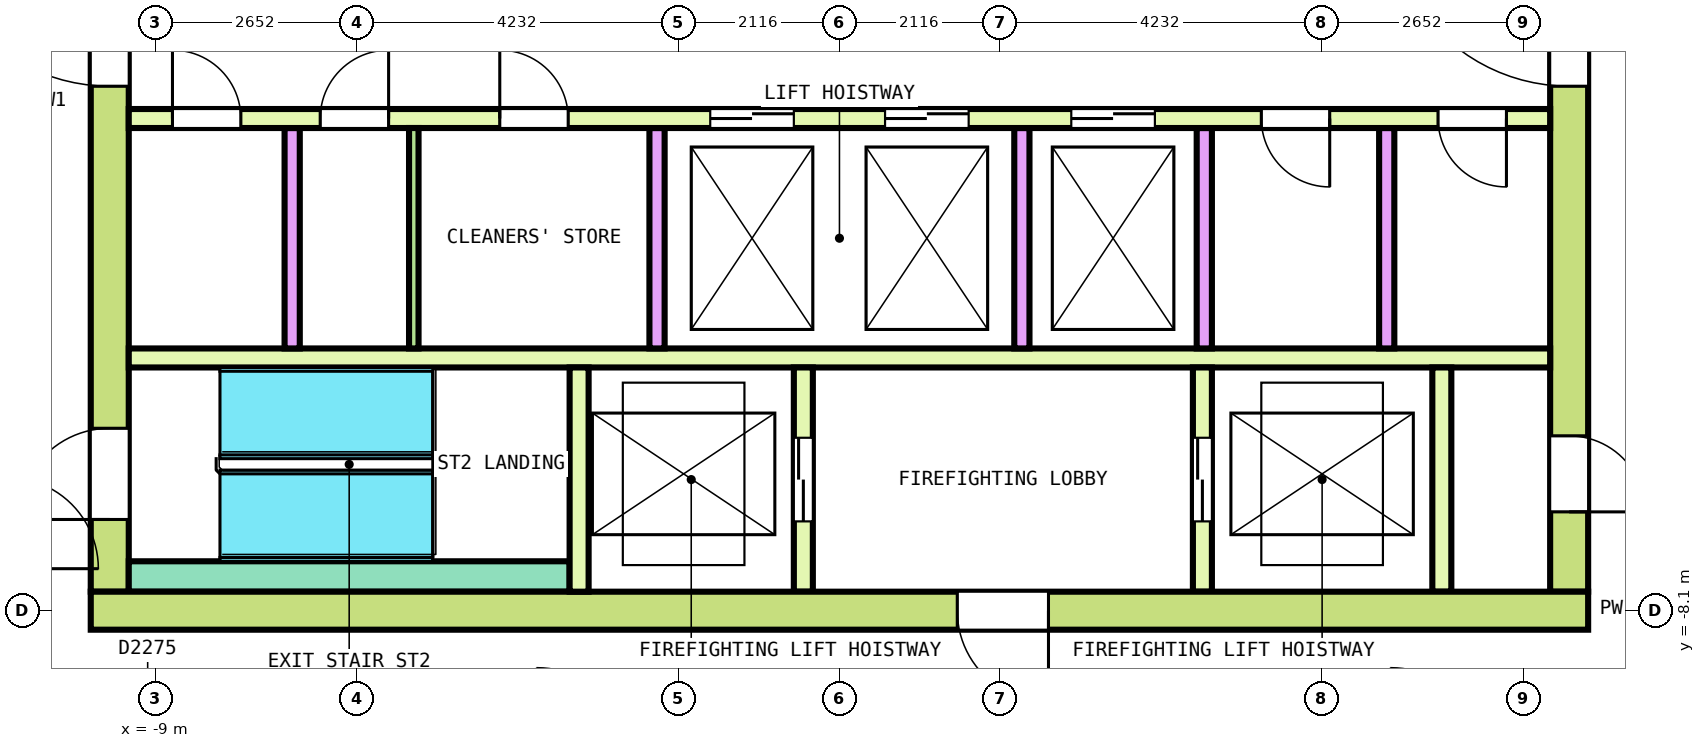
"""IFC4 building model, lengths in metres.
Left out: names, types, materials, properties, quantities, classifications, styles, units other than length and angle.
Written with IfcOpenShell. Run it as: python <this file> out.ifc"""

import sys

from ifc_helpers import new_model, si_unit, direction, frame, frame_2d, origin, place, context, subcontext, project, spatial, rectangle, extrude, element, fill, save


model = new_model("IFC4")
c1 = context("Model", 3, precision=1e-05, world=origin(), true_north=direction((0.0, 1.0)))
c2 = subcontext(c1, "Body", "Model", "MODEL_VIEW")
j1 = project(units=[si_unit("LENGTHUNIT", "METRE"), si_unit("PLANEANGLEUNIT", "RADIAN")], contexts=[c1])
p1 = place(None, origin())
s1 = spatial("IfcSite", under=j1, at=p1, CompositionType="ELEMENT")
p2 = place(p1, origin())
s2 = spatial("IfcBuilding", under=s1, at=p2, CompositionType="ELEMENT")
p3 = place(p2, frame((0.0, 0.0, 299.0)))
s3 = spatial("IfcBuildingStorey", under=s2, at=p3, CompositionType="ELEMENT", Elevation=299.0)
p4 = place(p3, frame((-9.85, -8.1, 0.0), z_axis=(0.0, 0.0, 1.0), x_axis=(1.0, 0.0, 0.0)))
e1 = element("IfcWall", 1, at=p4, inside=s3, PredefinedType="SHEAR", context=c2, shape_type="SweptSolid", body=[
    extrude(rectangle(XDim=19.7, YDim=0.5, at=frame_2d((9.85, 0.0))), origin(), (0.0, 0.0, 1.0), 3.7),
])
p5 = place(p4, frame((11.4, 0.0, 0.0)))
e2 = element("IfcOpeningElement", 2, at=p5, cuts=e1, PredefinedType="OPENING", context=c2, shape_type="SweptSolid", body=[
    extrude(rectangle(XDim=1.2, YDim=2.1, at=frame_2d((0.6, 1.05))), frame((0.0, 0.26, 0.0), z_axis=(0.0, -1.0, 0.0), x_axis=(1.0, 0.0, 0.0)), (0.0, 0.0, 1.0), 0.52),
])
p6 = place(p3, frame((-9.6, -7.85, 0.0), z_axis=(0.0, 0.0, 1.0), x_axis=(0.0, 1.0, 0.0)))
e3 = element("IfcWall", 3, at=p6, inside=s3, PredefinedType="SHEAR", context=c2, shape_type="SweptSolid", body=[
    extrude(rectangle(XDim=15.7, YDim=0.5, at=frame_2d((7.85, 0.0))), origin(), (0.0, 0.0, 1.0), 3.7),
])
p7 = place(p6, frame((6.65, 0.0, 0.0)))
e4 = element("IfcOpeningElement", 4, at=p7, cuts=e3, PredefinedType="OPENING", context=c2, shape_type="SweptSolid", body=[
    extrude(rectangle(XDim=2.4, YDim=2.1, at=frame_2d((1.2, 1.05))), frame((0.0, 0.26, 0.0), z_axis=(0.0, -1.0, 0.0), x_axis=(1.0, 0.0, 0.0)), (0.0, 0.0, 1.0), 0.52),
])
p8 = place(p6, frame((13.55, 0.0, 0.0)))
e5 = element("IfcOpeningElement", 5, at=p8, cuts=e3, PredefinedType="OPENING", context=c2, shape_type="SweptSolid", body=[
    extrude(rectangle(XDim=1.2, YDim=2.1, at=frame_2d((0.6, 1.05))), frame((0.0, 0.26, 0.0), z_axis=(0.0, -1.0, 0.0), x_axis=(1.0, 0.0, 0.0)), (0.0, 0.0, 1.0), 0.52),
])
p9 = place(p6, frame((0.95, 0.0, 0.0)))
e6 = element("IfcOpeningElement", 6, at=p9, cuts=e3, PredefinedType="OPENING", context=c2, shape_type="SweptSolid", body=[
    extrude(rectangle(XDim=1.2, YDim=2.1, at=frame_2d((0.6, 1.05))), frame((0.0, 0.26, 0.0), z_axis=(0.0, -1.0, 0.0), x_axis=(1.0, 0.0, 0.0)), (0.0, 0.0, 1.0), 0.52),
])
p10 = place(p3, frame((9.6, -7.85, 0.0), z_axis=(0.0, 0.0, 1.0), x_axis=(0.0, 1.0, 0.0)))
e7 = element("IfcWall", 7, at=p10, inside=s3, PredefinedType="SHEAR", context=c2, shape_type="SweptSolid", body=[
    extrude(rectangle(XDim=15.7, YDim=0.5, at=frame_2d((7.85, 0.0))), origin(), (0.0, 0.0, 1.0), 3.7),
])
p11 = place(p10, frame((6.65, 0.0, 0.0)))
e8 = element("IfcOpeningElement", 8, at=p11, cuts=e7, PredefinedType="OPENING", context=c2, shape_type="SweptSolid", body=[
    extrude(rectangle(XDim=2.4, YDim=2.1, at=frame_2d((1.2, 1.05))), frame((0.0, 0.26, 0.0), z_axis=(0.0, -1.0, 0.0), x_axis=(1.0, 0.0, 0.0)), (0.0, 0.0, 1.0), 0.52),
])
p12 = place(p10, frame((13.55, 0.0, 0.0)))
e9 = element("IfcOpeningElement", 9, at=p12, cuts=e7, PredefinedType="OPENING", context=c2, shape_type="SweptSolid", body=[
    extrude(rectangle(XDim=1.2, YDim=2.1, at=frame_2d((0.6, 1.05))), frame((0.0, 0.26, 0.0), z_axis=(0.0, -1.0, 0.0), x_axis=(1.0, 0.0, 0.0)), (0.0, 0.0, 1.0), 0.52),
])
p13 = place(p10, frame((1.05, 0.0, 0.0)))
e10 = element("IfcOpeningElement", 10, at=p13, cuts=e7, PredefinedType="OPENING", context=c2, shape_type="SweptSolid", body=[
    extrude(rectangle(XDim=1.0, YDim=2.1, at=frame_2d((0.5, 1.05))), frame((0.0, 0.26, 0.0), z_axis=(0.0, -1.0, 0.0), x_axis=(1.0, 0.0, 0.0)), (0.0, 0.0, 1.0), 0.52),
])
p14 = place(p3, frame((-9.35, -1.625, 0.0), z_axis=(0.0, 0.0, 1.0), x_axis=(1.0, 0.0, 0.0)))
e11 = element("IfcWall", 11, at=p14, inside=s3, PredefinedType="SOLIDWALL", context=c2, shape_type="SweptSolid", body=[
    extrude(rectangle(XDim=18.7, YDim=0.25, at=frame_2d((9.35, 0.0))), origin(), (0.0, 0.0, 1.0), 3.7),
])
p15 = place(p14, frame((7.65, 0.0, 0.0)))
e12 = element("IfcOpeningElement", 12, at=p15, cuts=e11, PredefinedType="OPENING", context=c2, shape_type="SweptSolid", body=[
    extrude(rectangle(XDim=1.1, YDim=2.1, at=frame_2d((0.55, 1.05))), frame((0.0, 0.135, 0.0), z_axis=(0.0, -1.0, 0.0), x_axis=(1.0, 0.0, 0.0)), (0.0, 0.0, 1.0), 0.27),
])
p16 = place(p14, frame((9.95, 0.0, 0.0)))
e13 = element("IfcOpeningElement", 13, at=p16, cuts=e11, PredefinedType="OPENING", context=c2, shape_type="SweptSolid", body=[
    extrude(rectangle(XDim=1.1, YDim=2.1, at=frame_2d((0.55, 1.05))), frame((0.0, 0.135, 0.0), z_axis=(0.0, -1.0, 0.0), x_axis=(1.0, 0.0, 0.0)), (0.0, 0.0, 1.0), 0.27),
])
p17 = place(p14, frame((12.4, 0.0, 0.0)))
e14 = element("IfcOpeningElement", 14, at=p17, cuts=e11, PredefinedType="OPENING", context=c2, shape_type="SweptSolid", body=[
    extrude(rectangle(XDim=1.1, YDim=2.1, at=frame_2d((0.55, 1.05))), frame((0.0, 0.135, 0.0), z_axis=(0.0, -1.0, 0.0), x_axis=(1.0, 0.0, 0.0)), (0.0, 0.0, 1.0), 0.27),
])
p18 = place(p14, frame((0.575, 0.0, 0.0)))
e15 = element("IfcOpeningElement", 15, at=p18, cuts=e11, PredefinedType="OPENING", context=c2, shape_type="SweptSolid", body=[
    extrude(rectangle(XDim=0.9, YDim=2.1, at=frame_2d((0.45, 1.05))), frame((0.0, 0.135, 0.0), z_axis=(0.0, -1.0, 0.0), x_axis=(1.0, 0.0, 0.0)), (0.0, 0.0, 1.0), 0.27),
])
p19 = place(p14, frame((2.519, 0.0, 0.0)))
e16 = element("IfcOpeningElement", 16, at=p19, cuts=e11, PredefinedType="OPENING", context=c2, shape_type="SweptSolid", body=[
    extrude(rectangle(XDim=0.9, YDim=2.1, at=frame_2d((0.45, 1.05))), frame((0.0, 0.135, 0.0), z_axis=(0.0, -1.0, 0.0), x_axis=(1.0, 0.0, 0.0)), (0.0, 0.0, 1.0), 0.27),
])
p20 = place(p14, frame((4.881, 0.0, 0.0)))
e17 = element("IfcOpeningElement", 17, at=p20, cuts=e11, PredefinedType="OPENING", context=c2, shape_type="SweptSolid", body=[
    extrude(rectangle(XDim=0.9, YDim=2.1, at=frame_2d((0.45, 1.05))), frame((0.0, 0.135, 0.0), z_axis=(0.0, -1.0, 0.0), x_axis=(1.0, 0.0, 0.0)), (0.0, 0.0, 1.0), 0.27),
])
p21 = place(p14, frame((14.9, 0.0, 0.0)))
e18 = element("IfcOpeningElement", 18, at=p21, cuts=e11, PredefinedType="OPENING", context=c2, shape_type="SweptSolid", body=[
    extrude(rectangle(XDim=0.9, YDim=2.1, at=frame_2d((0.45, 1.05))), frame((0.0, 0.135, 0.0), z_axis=(0.0, -1.0, 0.0), x_axis=(1.0, 0.0, 0.0)), (0.0, 0.0, 1.0), 0.27),
])
p22 = place(p14, frame((17.225, 0.0, 0.0)))
e19 = element("IfcOpeningElement", 19, at=p22, cuts=e11, PredefinedType="OPENING", context=c2, shape_type="SweptSolid", body=[
    extrude(rectangle(XDim=0.9, YDim=2.1, at=frame_2d((0.45, 1.05))), frame((0.0, 0.135, 0.0), z_axis=(0.0, -1.0, 0.0), x_axis=(1.0, 0.0, 0.0)), (0.0, 0.0, 1.0), 0.27),
])
p23 = place(p3, frame((-9.35, -4.775, 0.0), z_axis=(0.0, 0.0, 1.0), x_axis=(1.0, 0.0, 0.0)))
e20 = element("IfcWall", 20, at=p23, inside=s3, PredefinedType="SOLIDWALL", context=c2, shape_type="SweptSolid", body=[
    extrude(rectangle(XDim=18.7, YDim=0.25, at=frame_2d((9.35, 0.0))), origin(), (0.0, 0.0, 1.0), 3.7),
])
for number, where, z_axis, x_axis in (
    (21, (-7.2, -4.65, 0.0), (0.0, 0.0, 1.0), (0.0, 1.0, 0.0)),
    (22, (-2.4, -4.65, 0.0), (0.0, 0.0, 1.0), (0.0, 1.0, 0.0)),
    (23, (2.4, -4.65, 0.0), (0.0, 0.0, 1.0), (0.0, 1.0, 0.0)),
    (24, (4.8, -4.65, 0.0), (0.0, 0.0, 1.0), (0.0, 1.0, 0.0)),
    (25, (7.2, -4.65, 0.0), (0.0, 0.0, 1.0), (0.0, 1.0, 0.0)),
):
    element("IfcWall", number, at=place(p3, frame(where, z_axis=z_axis, x_axis=x_axis)), inside=s3, PredefinedType="SOLIDWALL", context=c2, shape_type="SweptSolid", body=[
        extrude(rectangle(XDim=2.9, YDim=0.2, at=frame_2d((1.45, 0.0))), origin(), (0.0, 0.0, 1.0), 3.7),
    ])
p24 = place(p3, frame((-9.35, -7.65, 0.0), z_axis=(0.0, 0.0, 1.0), x_axis=(1.0, 0.0, 0.0)))
e26 = element("IfcWall", 26, at=p24, inside=s3, PredefinedType="SOLIDWALL", context=c2, shape_type="SweptSolid", body=[
    extrude(rectangle(XDim=5.8, YDim=0.4, at=frame_2d((2.9, 0.0))), origin(), (0.0, 0.0, 1.0), 3.7),
])
p25 = place(p3, frame((-3.425, -7.85, 0.0), z_axis=(0.0, 0.0, 1.0), x_axis=(0.0, 1.0, 0.0)))
e27 = element("IfcWall", 27, at=p25, inside=s3, PredefinedType="SOLIDWALL", context=c2, shape_type="SweptSolid", body=[
    extrude(rectangle(XDim=2.95, YDim=0.25, at=frame_2d((1.475, 0.0))), origin(), (0.0, 0.0, 1.0), 3.7),
])
p26 = place(p3, frame((-0.475, -7.85, 0.0), z_axis=(0.0, 0.0, 1.0), x_axis=(0.0, 1.0, 0.0)))
e28 = element("IfcWall", 28, at=p26, inside=s3, PredefinedType="SOLIDWALL", context=c2, shape_type="SweptSolid", body=[
    extrude(rectangle(XDim=2.95, YDim=0.25, at=frame_2d((1.475, 0.0))), origin(), (0.0, 0.0, 1.0), 3.7),
])
p27 = place(p26, frame((0.925, 0.0, 0.0)))
e29 = element("IfcOpeningElement", 29, at=p27, cuts=e28, PredefinedType="OPENING", context=c2, shape_type="SweptSolid", body=[
    extrude(rectangle(XDim=1.1, YDim=2.1, at=frame_2d((0.55, 1.05))), frame((0.0, 0.135, 0.0), z_axis=(0.0, -1.0, 0.0), x_axis=(1.0, 0.0, 0.0)), (0.0, 0.0, 1.0), 0.27),
])
p28 = place(p3, frame((4.775, -7.85, 0.0), z_axis=(0.0, 0.0, 1.0), x_axis=(0.0, 1.0, 0.0)))
e30 = element("IfcWall", 30, at=p28, inside=s3, PredefinedType="SOLIDWALL", context=c2, shape_type="SweptSolid", body=[
    extrude(rectangle(XDim=2.95, YDim=0.25, at=frame_2d((1.475, 0.0))), origin(), (0.0, 0.0, 1.0), 3.7),
])
p29 = place(p28, frame((0.925, 0.0, 0.0)))
e31 = element("IfcOpeningElement", 31, at=p29, cuts=e30, PredefinedType="OPENING", context=c2, shape_type="SweptSolid", body=[
    extrude(rectangle(XDim=1.1, YDim=2.1, at=frame_2d((0.55, 1.05))), frame((0.0, 0.135, 0.0), z_axis=(0.0, -1.0, 0.0), x_axis=(1.0, 0.0, 0.0)), (0.0, 0.0, 1.0), 0.27),
])
p30 = place(p3, frame((7.925, -7.85, 0.0), z_axis=(0.0, 0.0, 1.0), x_axis=(0.0, 1.0, 0.0)))
e32 = element("IfcWall", 32, at=p30, inside=s3, PredefinedType="SOLIDWALL", context=c2, shape_type="SweptSolid", body=[
    extrude(rectangle(XDim=2.95, YDim=0.25, at=frame_2d((1.475, 0.0))), origin(), (0.0, 0.0, 1.0), 3.7),
])
p31 = place(p3, frame((-5.6, -4.65, 0.0), z_axis=(0.0, 0.0, 1.0), x_axis=(0.0, 1.0, 0.0)))
e33 = element("IfcWall", 33, at=p31, inside=s3, PredefinedType="PARTITIONING", context=c2, shape_type="SweptSolid", body=[
    extrude(rectangle(XDim=2.9, YDim=0.125, at=frame_2d((1.45, 0.0))), origin(), (0.0, 0.0, 1.0), 3.7),
])
p32 = place(p15, origin())
e34 = element("IfcDoor", 34, at=p32, inside=s3, OperationType="DOUBLE_DOOR_SLIDING", PredefinedType="DOOR", context=c2, shape_type="SweptSolid", body=[
    extrude(rectangle(XDim=1.1, YDim=2.1, at=frame_2d((0.55, 1.05))), frame((0.0, 0.075, 0.0), z_axis=(0.0, -1.0, 0.0), x_axis=(1.0, 0.0, 0.0)), (0.0, 0.0, 1.0), 0.15),
])
fill(e12, e34)
p33 = place(p16, origin())
e35 = element("IfcDoor", 35, at=p33, inside=s3, OperationType="DOUBLE_DOOR_SLIDING", PredefinedType="DOOR", context=c2, shape_type="SweptSolid", body=[
    extrude(rectangle(XDim=1.1, YDim=2.1, at=frame_2d((0.55, 1.05))), frame((0.0, 0.075, 0.0), z_axis=(0.0, -1.0, 0.0), x_axis=(1.0, 0.0, 0.0)), (0.0, 0.0, 1.0), 0.15),
])
fill(e13, e35)
p34 = place(p17, origin())
e36 = element("IfcDoor", 36, at=p34, inside=s3, OperationType="DOUBLE_DOOR_SLIDING", PredefinedType="DOOR", context=c2, shape_type="SweptSolid", body=[
    extrude(rectangle(XDim=1.1, YDim=2.1, at=frame_2d((0.55, 1.05))), frame((0.0, 0.075, 0.0), z_axis=(0.0, -1.0, 0.0), x_axis=(1.0, 0.0, 0.0)), (0.0, 0.0, 1.0), 0.15),
])
fill(e14, e36)
p35 = place(p27, origin())
e37 = element("IfcDoor", 37, at=p35, inside=s3, OperationType="DOUBLE_DOOR_SLIDING", PredefinedType="DOOR", context=c2, shape_type="SweptSolid", body=[
    extrude(rectangle(XDim=1.1, YDim=2.1, at=frame_2d((0.55, 1.05))), frame((0.0, 0.075, 0.0), z_axis=(0.0, -1.0, 0.0), x_axis=(1.0, 0.0, 0.0)), (0.0, 0.0, 1.0), 0.15),
])
fill(e29, e37)
p36 = place(p29, origin())
e38 = element("IfcDoor", 38, at=p36, inside=s3, OperationType="DOUBLE_DOOR_SLIDING", PredefinedType="DOOR", context=c2, shape_type="SweptSolid", body=[
    extrude(rectangle(XDim=1.1, YDim=2.1, at=frame_2d((0.55, 1.05))), frame((0.0, 0.075, 0.0), z_axis=(0.0, -1.0, 0.0), x_axis=(1.0, 0.0, 0.0)), (0.0, 0.0, 1.0), 0.15),
])
fill(e31, e38)
p37 = place(p7, origin())
e39 = element("IfcDoor", 39, at=p37, inside=s3, OperationType="DOUBLE_DOOR_SINGLE_SWING", PredefinedType="DOOR", context=c2, shape_type="SweptSolid", body=[
    extrude(rectangle(XDim=2.4, YDim=2.1, at=frame_2d((1.2, 1.05))), frame((0.0, 0.2, 0.0), z_axis=(0.0, -1.0, 0.0), x_axis=(1.0, 0.0, 0.0)), (0.0, 0.0, 1.0), 0.4),
])
fill(e4, e39)
p38 = place(p11, origin())
e40 = element("IfcDoor", 40, at=p38, inside=s3, OperationType="DOUBLE_DOOR_SINGLE_SWING", PredefinedType="DOOR", context=c2, shape_type="SweptSolid", body=[
    extrude(rectangle(XDim=2.4, YDim=2.1, at=frame_2d((1.2, 1.05))), frame((0.0, 0.2, 0.0), z_axis=(0.0, -1.0, 0.0), x_axis=(1.0, 0.0, 0.0)), (0.0, 0.0, 1.0), 0.4),
])
fill(e8, e40)
p39 = place(p9, origin())
e41 = element("IfcDoor", 41, at=p39, inside=s3, OperationType="SINGLE_SWING_RIGHT", PredefinedType="DOOR", context=c2, shape_type="SweptSolid", body=[
    extrude(rectangle(XDim=1.2, YDim=2.1, at=frame_2d((0.6, 1.05))), frame((0.0, 0.2, 0.0), z_axis=(0.0, -1.0, 0.0), x_axis=(1.0, 0.0, 0.0)), (0.0, 0.0, 1.0), 0.4),
])
fill(e6, e41)
p40 = place(p5, origin())
e42 = element("IfcDoor", 42, at=p40, inside=s3, OperationType="SINGLE_SWING_RIGHT", PredefinedType="DOOR", context=c2, shape_type="SweptSolid", body=[
    extrude(rectangle(XDim=1.2, YDim=2.1, at=frame_2d((0.6, 1.05))), frame((0.0, 0.2, 0.0), z_axis=(0.0, -1.0, 0.0), x_axis=(1.0, 0.0, 0.0)), (0.0, 0.0, 1.0), 0.4),
])
fill(e2, e42)
p41 = place(p13, origin())
e43 = element("IfcDoor", 43, at=p41, inside=s3, OperationType="SINGLE_SWING_RIGHT", PredefinedType="DOOR", context=c2, shape_type="SweptSolid", body=[
    extrude(rectangle(XDim=1.0, YDim=2.1, at=frame_2d((0.5, 1.05))), frame((0.0, 0.2, 0.0), z_axis=(0.0, -1.0, 0.0), x_axis=(1.0, 0.0, 0.0)), (0.0, 0.0, 1.0), 0.4),
])
fill(e10, e43)
p42 = place(p18, origin())
e44 = element("IfcDoor", 44, at=p42, inside=s3, OperationType="SINGLE_SWING_RIGHT", PredefinedType="DOOR", context=c2, shape_type="SweptSolid", body=[
    extrude(rectangle(XDim=0.9, YDim=2.1, at=frame_2d((0.45, 1.05))), frame((0.0, 0.075, 0.0), z_axis=(0.0, -1.0, 0.0), x_axis=(1.0, 0.0, 0.0)), (0.0, 0.0, 1.0), 0.15),
])
fill(e15, e44)
p43 = place(p19, origin())
e45 = element("IfcDoor", 45, at=p43, inside=s3, OperationType="SINGLE_SWING_LEFT", PredefinedType="DOOR", context=c2, shape_type="SweptSolid", body=[
    extrude(rectangle(XDim=0.9, YDim=2.1, at=frame_2d((0.45, 1.05))), frame((0.0, 0.075, 0.0), z_axis=(0.0, -1.0, 0.0), x_axis=(1.0, 0.0, 0.0)), (0.0, 0.0, 1.0), 0.15),
])
fill(e16, e45)
p44 = place(p20, origin())
e46 = element("IfcDoor", 46, at=p44, inside=s3, OperationType="SINGLE_SWING_RIGHT", PredefinedType="DOOR", context=c2, shape_type="SweptSolid", body=[
    extrude(rectangle(XDim=0.9, YDim=2.1, at=frame_2d((0.45, 1.05))), frame((0.0, 0.075, 0.0), z_axis=(0.0, -1.0, 0.0), x_axis=(1.0, 0.0, 0.0)), (0.0, 0.0, 1.0), 0.15),
])
fill(e17, e46)
p45 = place(p21, origin())
e47 = element("IfcDoor", 47, at=p45, inside=s3, OperationType="SINGLE_SWING_LEFT", PredefinedType="DOOR", context=c2, shape_type="SweptSolid", body=[
    extrude(rectangle(XDim=0.9, YDim=2.1, at=frame_2d((0.45, 1.05))), frame((0.0, 0.075, 0.0), z_axis=(0.0, -1.0, 0.0), x_axis=(1.0, 0.0, 0.0)), (0.0, 0.0, 1.0), 0.15),
])
fill(e18, e47)
p46 = place(p22, origin())
e48 = element("IfcDoor", 48, at=p46, inside=s3, OperationType="SINGLE_SWING_RIGHT", PredefinedType="DOOR", context=c2, shape_type="SweptSolid", body=[
    extrude(rectangle(XDim=0.9, YDim=2.1, at=frame_2d((0.45, 1.05))), frame((0.0, 0.075, 0.0), z_axis=(0.0, -1.0, 0.0), x_axis=(1.0, 0.0, 0.0)), (0.0, 0.0, 1.0), 0.15),
])
fill(e19, e48)
save(model, sys.argv[1])
